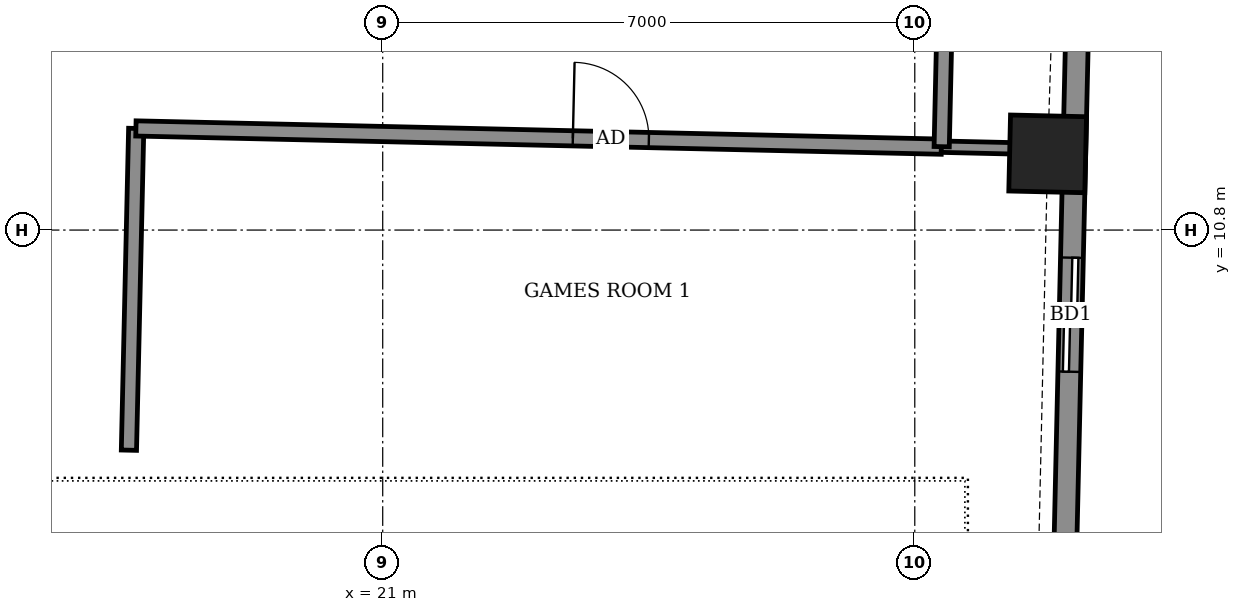
"""IFC4 building model, lengths in metres.
Left out: names, types, materials, properties, quantities, classifications, styles, units other than length and angle.
Written with IfcOpenShell. Run it as: python <this file> out.ifc"""

import sys

from ifc_helpers import new_model, si_unit, direction, frame, frame_2d, origin, origin_2d, place, context, subcontext, project, spatial, rectangle, extrude, element, fill, save


model = new_model("IFC4")
c1 = context("Model", 3, precision=1e-05, world=origin(), true_north=direction((0.0, 1.0)))
c2 = subcontext(c1, "Body", "Model", "MODEL_VIEW")
j1 = project(units=[si_unit("LENGTHUNIT", "METRE"), si_unit("PLANEANGLEUNIT", "RADIAN")], contexts=[c1])
p1 = place(None, origin())
s1 = spatial("IfcSite", under=j1, at=p1, CompositionType="ELEMENT")
p2 = place(p1, origin())
s2 = spatial("IfcBuilding", under=s1, at=p2, CompositionType="ELEMENT")
p3 = place(p2, frame((0.0, 0.0, 268.1)))
s3 = spatial("IfcBuildingStorey", under=s2, at=p3, CompositionType="ELEMENT", Elevation=268.1)
p4 = place(p3, frame((29.748, 11.802, -0.55), z_axis=(0.0, 0.0, 1.0), x_axis=(0.0226694311, 0.999743015426, 0.0)))
e1 = element("IfcColumn", 1, at=p4, inside=s3, PredefinedType="COLUMN", context=c2, shape_type="SweptSolid", body=[
    extrude(rectangle(XDim=1.0, YDim=1.0, at=origin_2d()), origin(), (0.0, 0.0, 1.0), 3.6),
])
p5 = place(p3, frame((29.923, 4.085, 0.0), z_axis=(0.0, 0.0, 1.0), x_axis=(0.022738672774, 0.999741442954, 0.0)))
e2 = element("IfcWall", 2, at=p5, inside=s3, PredefinedType="SOLIDWALL", context=c2, shape_type="SweptSolid", body=[
    extrude(rectangle(XDim=14.774, YDim=0.3, at=frame_2d((7.387, 0.0))), origin(), (0.0, 0.0, 1.0), 2.55),
])
p6 = place(p5, frame((4.853, 0.0, 0.0)))
e3 = element("IfcOpeningElement", 3, at=p6, cuts=e2, PredefinedType="OPENING", context=c2, shape_type="SweptSolid", body=[
    extrude(rectangle(XDim=1.5, YDim=2.4, at=frame_2d((0.75, 1.2))), frame((0.0, 0.16, 0.0), z_axis=(0.0, -1.0, 0.0), x_axis=(1.0, 0.0, 0.0)), (0.0, 0.0, 1.0), 0.32),
])
p7 = place(p5, frame((10.538, 0.0, 0.9)))
e4 = element("IfcOpeningElement", 4, at=p7, cuts=e2, PredefinedType="OPENING", context=c2, shape_type="SweptSolid", body=[
    extrude(rectangle(XDim=2.4, YDim=1.5, at=frame_2d((1.2, 0.75))), frame((0.0, 0.16, 0.0), z_axis=(0.0, -1.0, 0.0), x_axis=(1.0, 0.0, 0.0)), (0.0, 0.0, 1.0), 0.32),
])
p8 = place(p3, frame((17.661, 7.904, 0.0), z_axis=(0.0, 0.0, 1.0), x_axis=(0.022718785711, 0.999741895079, 0.0)))
e5 = element("IfcWall", 5, at=p8, inside=s3, PredefinedType="PARTITIONING", context=c2, shape_type="SweptSolid", body=[
    extrude(rectangle(XDim=4.234, YDim=0.2, at=frame_2d((2.117, 0.0))), origin(), (0.0, 0.0, 1.0), 3.05),
])
p9 = place(p3, frame((17.753, 12.137, 0.0), z_axis=(0.0, 0.0, 1.0), x_axis=(0.999743663474, -0.022640833553, 0.0)))
e6 = element("IfcWall", 6, at=p9, inside=s3, PredefinedType="PARTITIONING", context=c2, shape_type="SweptSolid", body=[
    extrude(rectangle(XDim=10.6, YDim=0.2, at=frame_2d((5.3, 0.0))), origin(), (0.0, 0.0, 1.0), 3.05),
])
p10 = place(p9, frame((5.75, 0.0, 0.0)))
e7 = element("IfcOpeningElement", 7, at=p10, cuts=e6, PredefinedType="OPENING", context=c2, shape_type="SweptSolid", body=[
    extrude(rectangle(XDim=1.0, YDim=2.1, at=frame_2d((0.5, 1.05))), frame((0.0, 0.11, 0.0), z_axis=(0.0, -1.0, 0.0), x_axis=(1.0, 0.0, 0.0)), (0.0, 0.0, 1.0), 0.22),
])
p11 = place(p3, frame((28.35, 11.897, 0.0), z_axis=(0.0, 0.0, 1.0), x_axis=(0.999734618493, -0.023036765969, 0.0)))
e8 = element("IfcWall", 8, at=p11, inside=s3, PredefinedType="PARTITIONING", context=c2, shape_type="SweptSolid", body=[
    extrude(rectangle(XDim=1.6, YDim=0.15, at=frame_2d((0.8, 0.0))), origin(), (0.0, 0.0, 1.0), 3.05),
])
p12 = place(p3, frame((28.354, 11.897, 0.0), z_axis=(0.0, 0.0, 1.0), x_axis=(0.022632637625, 0.99974384905, 0.0)))
e9 = element("IfcWall", 9, at=p12, inside=s3, PredefinedType="PARTITIONING", context=c2, shape_type="SweptSolid", body=[
    extrude(rectangle(XDim=1.5, YDim=0.2, at=frame_2d((0.75, 0.0))), origin(), (0.0, 0.0, 1.0), 3.05),
])
p13 = place(p6, origin())
e10 = element("IfcDoor", 10, at=p13, inside=s3, OperationType="SLIDING_TO_LEFT", PredefinedType="DOOR", context=c2, shape_type="SweptSolid", body=[
    extrude(rectangle(XDim=1.5, YDim=2.4, at=frame_2d((0.75, 1.2))), frame((0.0, 0.025, 0.0), z_axis=(0.0, -1.0, 0.0), x_axis=(1.0, 0.0, 0.0)), (0.0, 0.0, 1.0), 0.05),
])
fill(e3, e10)
p14 = place(p10, origin())
e11 = element("IfcDoor", 11, at=p14, inside=s3, OperationType="SINGLE_SWING_RIGHT", PredefinedType="DOOR", context=c2, shape_type="SweptSolid", body=[
    extrude(rectangle(XDim=1.0, YDim=2.1, at=frame_2d((0.5, 1.05))), frame((0.0, 0.025, 0.0), z_axis=(0.0, -1.0, 0.0), x_axis=(1.0, 0.0, 0.0)), (0.0, 0.0, 1.0), 0.05),
])
fill(e7, e11)
save(model, sys.argv[1])
